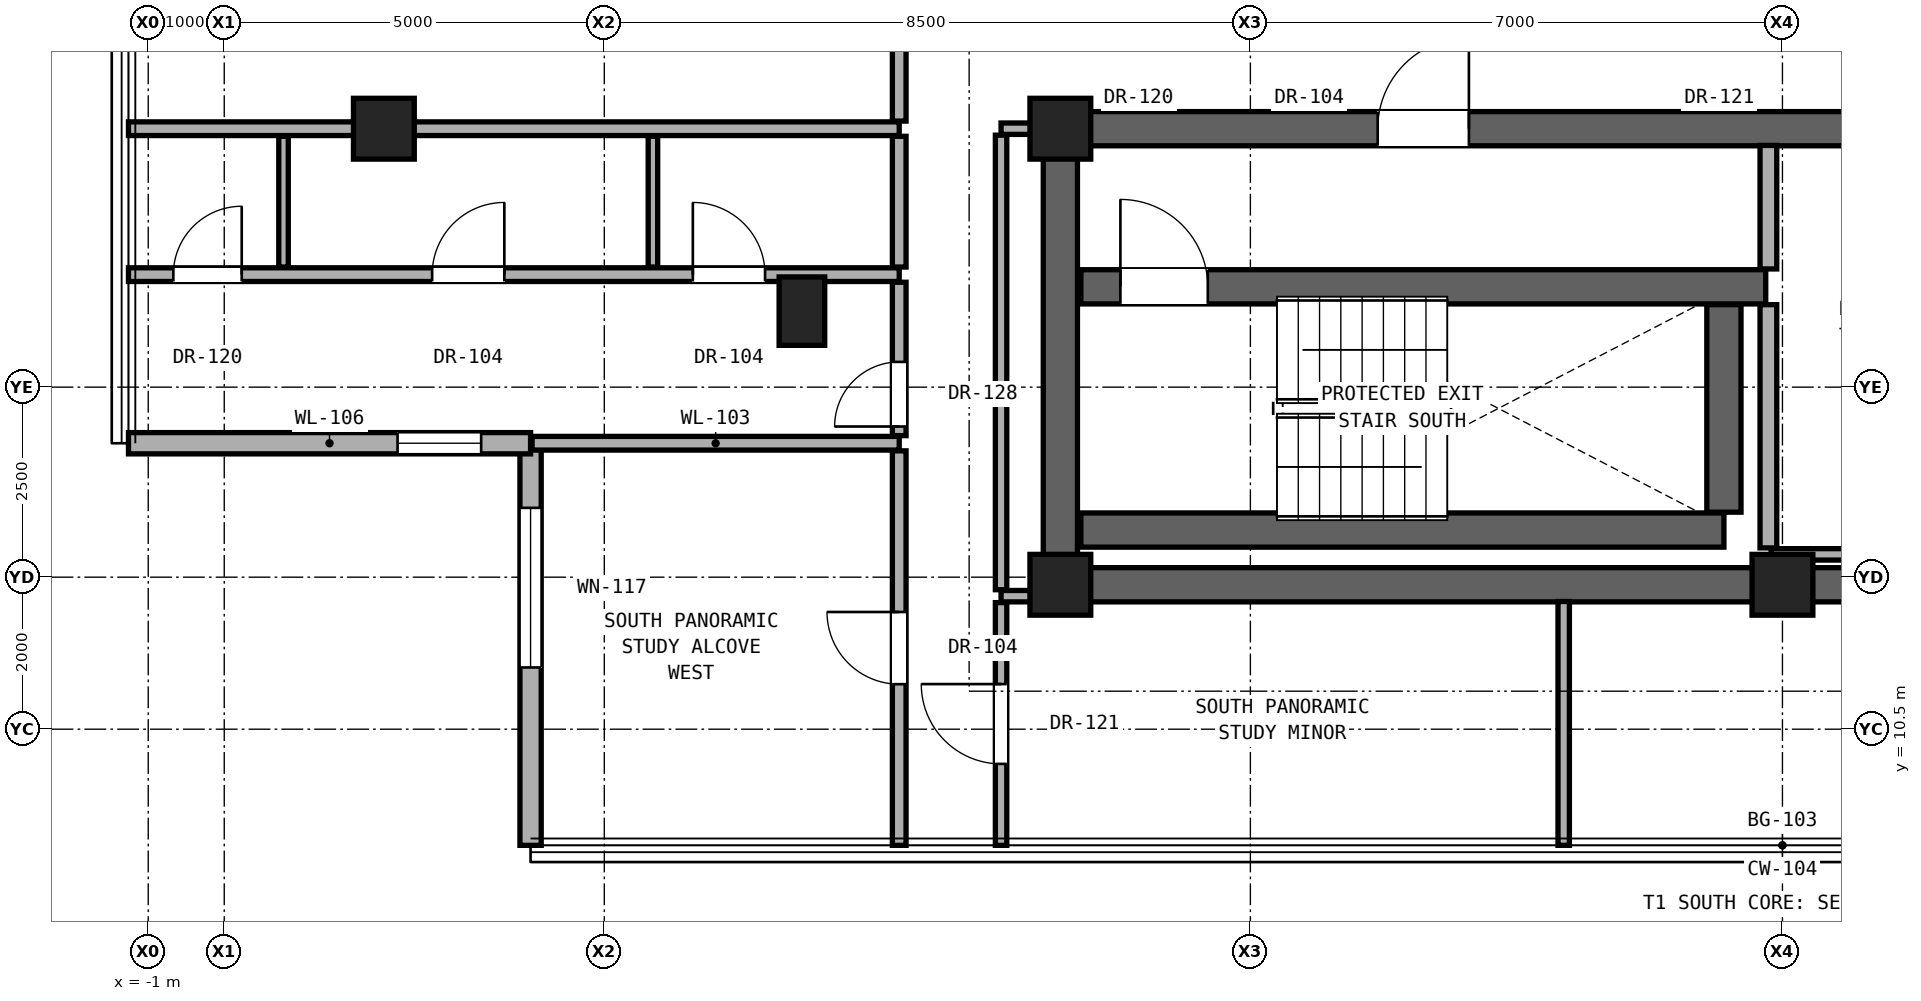
"""IFC4 building model, lengths in metres.
Left out: names, types, materials, properties, quantities, classifications, styles, units other than length and angle.
Written with IfcOpenShell. Run it as: python <this file> out.ifc"""

import sys

from ifc_helpers import new_model, si_unit, direction, frame, frame_2d, origin, origin_2d, place, context, subcontext, project, spatial, rectangle, hollow_rectangle, extrude, element, fill, save


model = new_model("IFC4")
c1 = context("Model", 3, precision=1e-05, world=origin(), true_north=direction((0.0, 1.0)))
c2 = subcontext(c1, "Body", "Model", "MODEL_VIEW")
j1 = project(units=[si_unit("LENGTHUNIT", "METRE"), si_unit("PLANEANGLEUNIT", "RADIAN")], contexts=[c1])
p1 = place(None, origin())
s1 = spatial("IfcSite", under=j1, at=p1, CompositionType="ELEMENT")
p2 = place(p1, origin())
s2 = spatial("IfcBuilding", under=s1, at=p2, CompositionType="ELEMENT")
p3 = place(p2, frame((0.0, 0.0, 239.2)))
s3 = spatial("IfcBuildingStorey", under=s2, at=p3, CompositionType="ELEMENT", Elevation=239.2)
for number, where, z_axis, x_axis in (
    (1, (11.0, 12.4, 0.0), (0.0, 0.0, 1.0), (1.0, 0.0, 0.0)),
    (2, (20.5, 12.4, 0.0), (0.0, 0.0, 1.0), (1.0, 0.0, 0.0)),
    (3, (11.0, 18.4, 0.0), (0.0, 0.0, 1.0), (1.0, 0.0, 0.0)),
):
    element("IfcColumn", number, at=place(p3, frame(where, z_axis=z_axis, x_axis=x_axis)), inside=s3, PredefinedType="COLUMN", context=c2, shape_type="SweptSolid", body=[
        extrude(rectangle(XDim=0.8, YDim=0.8, at=origin_2d()), origin(), (0.0, 0.0, 1.0), 3.3),
    ])
p4 = place(p3, frame((2.1, 18.4, 0.0), z_axis=(0.0, 0.0, 1.0), x_axis=(1.0, 0.0, 0.0)))
e4 = element("IfcColumn", 4, at=p4, inside=s3, PredefinedType="COLUMN", context=c2, shape_type="SweptSolid", body=[
    extrude(hollow_rectangle(XDim=0.8, YDim=0.8, WallThickness=0.045, at=origin_2d()), origin(), (0.0, 0.0, 1.0), 3.3),
])
p5 = place(p3, frame((7.6, 16.0, 0.0), z_axis=(0.0, 0.0, 1.0), x_axis=(1.0, 0.0, 0.0)))
e5 = element("IfcColumn", 5, at=p5, inside=s3, PredefinedType="PILASTER", context=c2, shape_type="SweptSolid", body=[
    extrude(rectangle(XDim=0.6, YDim=0.9, at=origin_2d()), origin(), (0.0, 0.0, 1.0), 3.3),
])
p6 = place(p3, frame((11.0, 12.4, 0.0), z_axis=(0.0, 0.0, 1.0), x_axis=(1.0, 0.0, 0.0)))
e6 = element("IfcWall", 6, at=p6, inside=s3, PredefinedType="SHEAR", context=c2, shape_type="SweptSolid", body=[
    extrude(rectangle(XDim=19.0, YDim=0.45, at=frame_2d((9.5, 0.0))), origin(), (0.0, 0.0, 1.0), 3.1),
])
p7 = place(p3, frame((11.0, 12.4, 0.0), z_axis=(0.0, 0.0, 1.0), x_axis=(0.0, 1.0, 0.0)))
e7 = element("IfcWall", 7, at=p7, inside=s3, PredefinedType="SHEAR", context=c2, shape_type="SweptSolid", body=[
    extrude(rectangle(XDim=6.0, YDim=0.45, at=frame_2d((3.0, 0.0))), origin(), (0.0, 0.0, 1.0), 3.1),
])
p8 = place(p3, frame((11.0, 18.4, 0.0), z_axis=(0.0, 0.0, 1.0), x_axis=(1.0, 0.0, 0.0)))
e8 = element("IfcWall", 8, at=p8, inside=s3, PredefinedType="SHEAR", context=c2, shape_type="SweptSolid", body=[
    extrude(rectangle(XDim=19.0, YDim=0.45, at=frame_2d((9.5, 0.0))), origin(), (0.0, 0.0, 1.0), 3.1),
])
p9 = place(p8, frame((4.175, 0.0, 0.0)))
e9 = element("IfcOpeningElement", 9, at=p9, cuts=e8, PredefinedType="OPENING", context=c2, shape_type="SweptSolid", body=[
    extrude(rectangle(XDim=1.2, YDim=2.25, at=frame_2d((0.6, 1.125))), frame((0.0, 0.235, 0.0), z_axis=(0.0, -1.0, 0.0), x_axis=(1.0, 0.0, 0.0)), (0.0, 0.0, 1.0), 0.47),
])
p10 = place(p8, frame((11.075, 0.0, 0.0)))
e10 = element("IfcOpeningElement", 10, at=p10, cuts=e8, PredefinedType="OPENING", context=c2, shape_type="SweptSolid", body=[
    extrude(rectangle(XDim=0.95, YDim=2.15, at=frame_2d((0.475, 1.075))), frame((0.0, 0.235, 0.0), z_axis=(0.0, -1.0, 0.0), x_axis=(1.0, 0.0, 0.0)), (0.0, 0.0, 1.0), 0.47),
])
p11 = place(p8, frame((14.3, 0.0, 0.0)))
e11 = element("IfcOpeningElement", 11, at=p11, cuts=e8, PredefinedType="OPENING", context=c2, shape_type="SweptSolid", body=[
    extrude(rectangle(XDim=1.3, YDim=2.3, at=frame_2d((0.65, 1.15))), frame((0.0, 0.235, 0.0), z_axis=(0.0, -1.0, 0.0), x_axis=(1.0, 0.0, 0.0)), (0.0, 0.0, 1.0), 0.47),
])
p12 = place(p8, frame((16.6, 0.0, 0.0)))
e12 = element("IfcOpeningElement", 12, at=p12, cuts=e8, PredefinedType="OPENING", context=c2, shape_type="SweptSolid", body=[
    extrude(rectangle(XDim=1.3, YDim=2.3, at=frame_2d((0.65, 1.15))), frame((0.0, 0.235, 0.0), z_axis=(0.0, -1.0, 0.0), x_axis=(1.0, 0.0, 0.0)), (0.0, 0.0, 1.0), 0.47),
])
p13 = place(p3, frame((4.03, 14.262, 0.0), z_axis=(0.0, 0.0, 1.0), x_axis=(0.0, -1.0, 0.0)))
e13 = element("IfcWall", 13, at=p13, inside=s3, PredefinedType="SOLIDWALL", context=c2, shape_type="SweptSolid", body=[
    extrude(rectangle(XDim=5.29, YDim=0.28, at=frame_2d((2.645, 0.0))), origin(), (0.0, 0.0, 1.0), 3.08),
])
p14 = place(p13, frame((0.85, 0.0, 0.73)))
e14 = element("IfcOpeningElement", 14, at=p14, cuts=e13, PredefinedType="OPENING", context=c2, shape_type="SweptSolid", body=[
    extrude(rectangle(XDim=2.1, YDim=2.2, at=frame_2d((1.05, 1.1))), frame((0.0, 0.15, 0.0), z_axis=(0.0, -1.0, 0.0), x_axis=(1.0, 0.0, 0.0)), (0.0, 0.0, 1.0), 0.3),
])
p15 = place(p3, frame((-1.26, 14.262, 0.0), z_axis=(0.0, 0.0, 1.0), x_axis=(1.0, 0.0, 0.0)))
e15 = element("IfcWall", 15, at=p15, inside=s3, PredefinedType="SOLIDWALL", context=c2, shape_type="SweptSolid", body=[
    extrude(rectangle(XDim=5.29, YDim=0.28, at=frame_2d((2.645, 0.0))), origin(), (0.0, 0.0, 1.0), 3.08),
])
p16 = place(p15, frame((3.54, 0.0, 0.85)))
e16 = element("IfcOpeningElement", 16, at=p16, cuts=e15, PredefinedType="OPENING", context=c2, shape_type="SweptSolid", body=[
    extrude(rectangle(XDim=1.1, YDim=2.0, at=frame_2d((0.55, 1.0))), frame((0.0, 0.15, 0.0), z_axis=(0.0, -1.0, 0.0), x_axis=(1.0, 0.0, 0.0)), (0.0, 0.0, 1.0), 0.3),
])
p17 = place(p3, frame((10.22, 12.25, 0.0), z_axis=(0.0, 0.0, 1.0), x_axis=(1.0, 0.0, 0.0)))
e17 = element("IfcWall", 17, at=p17, inside=s3, PredefinedType="PARTITIONING", context=c2, shape_type="SweptSolid", body=[
    extrude(rectangle(XDim=0.56, YDim=0.15, at=frame_2d((0.28, 0.0))), origin(), (0.0, 0.0, 1.0), 3.1),
])
p18 = place(p3, frame((20.35, 12.8, 0.0), z_axis=(0.0, 0.0, 1.0), x_axis=(1.0, 0.0, 0.0)))
e18 = element("IfcWall", 18, at=p18, inside=s3, PredefinedType="PARTITIONING", context=c2, shape_type="SweptSolid", body=[
    extrude(rectangle(XDim=8.9, YDim=0.15, at=frame_2d((4.45, 0.0))), origin(), (0.0, 0.0, 1.0), 3.1),
])
p19 = place(p3, frame((11.27, 13.12, 0.0), z_axis=(0.0, 0.0, 1.0), x_axis=(1.0, 0.0, 0.0)))
e19 = element("IfcWall", 19, at=p19, inside=s3, PredefinedType="SHEAR", context=c2, shape_type="SweptSolid", body=[
    extrude(rectangle(XDim=8.46, YDim=0.45, at=frame_2d((4.23, 0.0))), origin(), (0.0, 0.0, 1.0), 3.1),
])
p20 = place(p3, frame((4.05, 14.262, 0.0), z_axis=(0.0, 0.0, 1.0), x_axis=(1.0, 0.0, 0.0)))
e20 = element("IfcWall", 20, at=p20, inside=s3, PredefinedType="PARTITIONING", context=c2, shape_type="SweptSolid", body=[
    extrude(rectangle(XDim=4.83, YDim=0.18, at=frame_2d((2.415, 0.0))), origin(), (0.0, 0.0, 1.0), 3.1),
])
p21 = place(p3, frame((11.27, 16.32, 0.0), z_axis=(0.0, 0.0, 1.0), x_axis=(1.0, 0.0, 0.0)))
e21 = element("IfcWall", 21, at=p21, inside=s3, PredefinedType="SHEAR", context=c2, shape_type="SweptSolid", body=[
    extrude(rectangle(XDim=9.01, YDim=0.45, at=frame_2d((4.505, 0.0))), origin(), (0.0, 0.0, 1.0), 3.1),
])
p22 = place(p21, frame((0.52, 0.0, 0.0)))
e22 = element("IfcOpeningElement", 22, at=p22, cuts=e21, PredefinedType="OPENING", context=c2, shape_type="SweptSolid", body=[
    extrude(rectangle(XDim=1.15, YDim=2.2, at=frame_2d((0.575, 1.1))), frame((0.0, 0.235, 0.0), z_axis=(0.0, -1.0, 0.0), x_axis=(1.0, 0.0, 0.0)), (0.0, 0.0, 1.0), 0.47),
])
p23 = place(p3, frame((-1.26, 16.48, 0.0), z_axis=(0.0, 0.0, 1.0), x_axis=(1.0, 0.0, 0.0)))
e23 = element("IfcWall", 23, at=p23, inside=s3, PredefinedType="PARTITIONING", context=c2, shape_type="SweptSolid", body=[
    extrude(rectangle(XDim=10.14, YDim=0.18, at=frame_2d((5.07, 0.0))), origin(), (0.0, 0.0, 1.0), 2.543),
])
p24 = place(p23, frame((3.995, 0.0, 0.0)))
e24 = element("IfcOpeningElement", 24, at=p24, cuts=e23, PredefinedType="OPENING", context=c2, shape_type="SweptSolid", body=[
    extrude(rectangle(XDim=0.95, YDim=2.15, at=frame_2d((0.475, 1.075))), frame((0.0, 0.1, 0.0), z_axis=(0.0, -1.0, 0.0), x_axis=(1.0, 0.0, 0.0)), (0.0, 0.0, 1.0), 0.2),
])
p25 = place(p23, frame((7.425, 0.0, 0.0)))
e25 = element("IfcOpeningElement", 25, at=p25, cuts=e23, PredefinedType="OPENING", context=c2, shape_type="SweptSolid", body=[
    extrude(rectangle(XDim=0.95, YDim=2.15, at=frame_2d((0.475, 1.075))), frame((0.0, 0.1, 0.0), z_axis=(0.0, -1.0, 0.0), x_axis=(1.0, 0.0, 0.0)), (0.0, 0.0, 1.0), 0.2),
])
p26 = place(p23, frame((0.59, 0.0, 0.0)))
e26 = element("IfcOpeningElement", 26, at=p26, cuts=e23, PredefinedType="OPENING", context=c2, shape_type="SweptSolid", body=[
    extrude(rectangle(XDim=0.9, YDim=2.1, at=frame_2d((0.45, 1.05))), frame((0.0, 0.1, 0.0), z_axis=(0.0, -1.0, 0.0), x_axis=(1.0, 0.0, 0.0)), (0.0, 0.0, 1.0), 0.2),
])
p27 = place(p3, frame((-1.26, 18.4, 0.0), z_axis=(0.0, 0.0, 1.0), x_axis=(1.0, 0.0, 0.0)))
e27 = element("IfcWall", 27, at=p27, inside=s3, PredefinedType="PARTITIONING", context=c2, shape_type="SweptSolid", body=[
    extrude(rectangle(XDim=10.14, YDim=0.18, at=frame_2d((5.07, 0.0))), origin(), (0.0, 0.0, 1.0), 2.319),
])
p28 = place(p3, frame((10.22, 18.4, 0.0), z_axis=(0.0, 0.0, 1.0), x_axis=(1.0, 0.0, 0.0)))
e28 = element("IfcWall", 28, at=p28, inside=s3, PredefinedType="PARTITIONING", context=c2, shape_type="SweptSolid", body=[
    extrude(rectangle(XDim=0.56, YDim=0.15, at=frame_2d((0.28, 0.0))), origin(), (0.0, 0.0, 1.0), 2.492),
])
p29 = place(p3, frame((0.78, 16.58, 0.0), z_axis=(0.0, 0.0, 1.0), x_axis=(0.0, 1.0, 0.0)))
e29 = element("IfcWall", 29, at=p29, inside=s3, PredefinedType="PARTITIONING", context=c2, shape_type="SweptSolid", body=[
    extrude(rectangle(XDim=1.72, YDim=0.125, at=frame_2d((0.86, 0.0))), origin(), (0.0, 0.0, 1.0), 3.1),
])
p30 = place(p3, frame((5.64, 16.58, 0.0), z_axis=(0.0, 0.0, 1.0), x_axis=(0.0, 1.0, 0.0)))
e30 = element("IfcWall", 30, at=p30, inside=s3, PredefinedType="PARTITIONING", context=c2, shape_type="SweptSolid", body=[
    extrude(rectangle(XDim=1.72, YDim=0.125, at=frame_2d((0.86, 0.0))), origin(), (0.0, 0.0, 1.0), 2.492),
])
p31 = place(p3, frame((8.88, 8.972, 0.0), z_axis=(0.0, 0.0, 1.0), x_axis=(0.0, 1.0, 0.0)))
e31 = element("IfcWall", 31, at=p31, inside=s3, PredefinedType="PARTITIONING", context=c2, shape_type="SweptSolid", body=[
    extrude(rectangle(XDim=5.19, YDim=0.18, at=frame_2d((2.595, 0.0))), origin(), (0.0, 0.0, 1.0), 3.1),
])
p32 = place(p31, frame((2.12, 0.0, 0.0)))
e32 = element("IfcOpeningElement", 32, at=p32, cuts=e31, PredefinedType="OPENING", context=c2, shape_type="SweptSolid", body=[
    extrude(rectangle(XDim=0.95, YDim=2.15, at=frame_2d((0.475, 1.075))), frame((0.0, 0.1, 0.0), z_axis=(0.0, -1.0, 0.0), x_axis=(1.0, 0.0, 0.0)), (0.0, 0.0, 1.0), 0.2),
])
p33 = place(p3, frame((8.88, 14.362, 0.0), z_axis=(0.0, 0.0, 1.0), x_axis=(0.0, 1.0, 0.0)))
e33 = element("IfcWall", 33, at=p33, inside=s3, PredefinedType="PARTITIONING", context=c2, shape_type="SweptSolid", body=[
    extrude(rectangle(XDim=2.018, YDim=0.18, at=frame_2d((1.009, 0.0))), origin(), (0.0, 0.0, 1.0), 3.1),
])
p34 = place(p33, frame((0.12, 0.0, 0.0)))
e34 = element("IfcOpeningElement", 34, at=p34, cuts=e33, PredefinedType="OPENING", context=c2, shape_type="SweptSolid", body=[
    extrude(rectangle(XDim=0.85, YDim=2.01, at=frame_2d((0.425, 1.005))), frame((0.0, 0.1, 0.0), z_axis=(0.0, -1.0, 0.0), x_axis=(1.0, 0.0, 0.0)), (0.0, 0.0, 1.0), 0.2),
])
p35 = place(p3, frame((8.88, 16.58, 0.0), z_axis=(0.0, 0.0, 1.0), x_axis=(0.0, 1.0, 0.0)))
e35 = element("IfcWall", 35, at=p35, inside=s3, PredefinedType="PARTITIONING", context=c2, shape_type="SweptSolid", body=[
    extrude(rectangle(XDim=1.72, YDim=0.18, at=frame_2d((0.86, 0.0))), origin(), (0.0, 0.0, 1.0), 2.492),
])
p36 = place(p3, frame((8.88, 18.5, 0.0), z_axis=(0.0, 0.0, 1.0), x_axis=(0.0, 1.0, 0.0)))
e36 = element("IfcWall", 36, at=p36, inside=s3, PredefinedType="PARTITIONING", context=c2, shape_type="SweptSolid", body=[
    extrude(rectangle(XDim=10.3, YDim=0.18, at=frame_2d((5.15, 0.0))), origin(), (0.0, 0.0, 1.0), 2.396),
])
p37 = place(p36, frame((4.625, 0.0, 0.0)))
e37 = element("IfcOpeningElement", 37, at=p37, cuts=e36, PredefinedType="OPENING", context=c2, shape_type="SweptSolid", body=[
    extrude(rectangle(XDim=1.05, YDim=2.2, at=frame_2d((0.525, 1.1))), frame((0.0, 0.1, 0.0), z_axis=(0.0, -1.0, 0.0), x_axis=(1.0, 0.0, 0.0)), (0.0, 0.0, 1.0), 0.2),
])
p38 = place(p3, frame((10.22, 8.972, 0.0), z_axis=(0.0, 0.0, 1.0), x_axis=(0.0, 1.0, 0.0)))
e38 = element("IfcWall", 38, at=p38, inside=s3, PredefinedType="PARTITIONING", context=c2, shape_type="SweptSolid", body=[
    extrude(rectangle(XDim=3.193, YDim=0.15, at=frame_2d((1.597, 0.0))), origin(), (0.0, 0.0, 1.0), 3.1),
])
p39 = place(p38, frame((1.072, 0.0, 0.0)))
e39 = element("IfcOpeningElement", 39, at=p39, cuts=e38, PredefinedType="OPENING", context=c2, shape_type="SweptSolid", body=[
    extrude(rectangle(XDim=1.05, YDim=2.2, at=frame_2d((0.525, 1.1))), frame((0.0, 0.085, 0.0), z_axis=(0.0, -1.0, 0.0), x_axis=(1.0, 0.0, 0.0)), (0.0, 0.0, 1.0), 0.17),
])
p40 = place(p3, frame((10.22, 12.335, 0.0), z_axis=(0.0, 0.0, 1.0), x_axis=(0.0, 1.0, 0.0)))
e40 = element("IfcWall", 40, at=p40, inside=s3, PredefinedType="PARTITIONING", context=c2, shape_type="SweptSolid", body=[
    extrude(rectangle(XDim=5.98, YDim=0.15, at=frame_2d((2.99, 0.0))), origin(), (0.0, 0.0, 1.0), 2.492),
])
p41 = place(p3, frame((17.622, 8.972, 0.0), z_axis=(0.0, 0.0, 1.0), x_axis=(0.0, 1.0, 0.0)))
e41 = element("IfcWall", 41, at=p41, inside=s3, PredefinedType="PARTITIONING", context=c2, shape_type="SweptSolid", body=[
    extrude(rectangle(XDim=3.208, YDim=0.15, at=frame_2d((1.604, 0.0))), origin(), (0.0, 0.0, 1.0), 3.1),
])
p42 = place(p3, frame((19.73, 13.355, 0.0), z_axis=(0.0, 0.0, 1.0), x_axis=(0.0, 1.0, 0.0)))
e42 = element("IfcWall", 42, at=p42, inside=s3, PredefinedType="SHEAR", context=c2, shape_type="SweptSolid", body=[
    extrude(rectangle(XDim=2.73, YDim=0.45, at=frame_2d((1.365, 0.0))), origin(), (0.0, 0.0, 1.0), 3.1),
])
p43 = place(p3, frame((20.315, 12.885, 0.0), z_axis=(0.0, 0.0, 1.0), x_axis=(0.0, 1.0, 0.0)))
e43 = element("IfcWall", 43, at=p43, inside=s3, PredefinedType="SOLIDWALL", context=c2, shape_type="SweptSolid", body=[
    extrude(rectangle(XDim=3.2, YDim=0.22, at=frame_2d((1.6, 0.0))), origin(), (0.0, 0.0, 1.0), 3.1),
])
p44 = place(p3, frame((20.315, 16.555, 0.0), z_axis=(0.0, 0.0, 1.0), x_axis=(0.0, 1.0, 0.0)))
e44 = element("IfcWall", 44, at=p44, inside=s3, PredefinedType="SOLIDWALL", context=c2, shape_type="SweptSolid", body=[
    extrude(rectangle(XDim=1.625, YDim=0.22, at=frame_2d((0.812, 0.0))), origin(), (0.0, 0.0, 1.0), 3.1),
])
p45 = place(p14, origin())
e45 = element("IfcWindow", 45, at=p45, inside=s3, PartitioningType="SINGLE_PANEL", PredefinedType="WINDOW", context=c2, shape_type="SweptSolid", body=[
    extrude(rectangle(XDim=2.1, YDim=2.2, at=frame_2d((1.05, 1.1))), frame((0.0, 0.03, 0.0), z_axis=(0.0, -1.0, 0.0), x_axis=(1.0, 0.0, 0.0)), (0.0, 0.0, 1.0), 0.06),
])
fill(e14, e45)
p46 = place(p16, origin())
e46 = element("IfcWindow", 46, at=p46, inside=s3, PartitioningType="SINGLE_PANEL", PredefinedType="WINDOW", context=c2, shape_type="SweptSolid", body=[
    extrude(rectangle(XDim=1.1, YDim=2.0, at=frame_2d((0.55, 1.0))), frame((0.0, 0.03, 0.0), z_axis=(0.0, -1.0, 0.0), x_axis=(1.0, 0.0, 0.0)), (0.0, 0.0, 1.0), 0.06),
])
fill(e16, e46)
p47 = place(p9, origin())
e47 = element("IfcDoor", 47, at=p47, inside=s3, OperationType="SINGLE_SWING_RIGHT", PredefinedType="DOOR", context=c2, shape_type="SweptSolid", body=[
    extrude(rectangle(XDim=1.2, YDim=2.25, at=frame_2d((0.6, 1.125))), frame((0.0, 0.025, 0.0), z_axis=(0.0, -1.0, 0.0), x_axis=(1.0, 0.0, 0.0)), (0.0, 0.0, 1.0), 0.05),
])
fill(e9, e47)
p48 = place(p22, origin())
e48 = element("IfcDoor", 48, at=p48, inside=s3, OperationType="SINGLE_SWING_LEFT", PredefinedType="DOOR", context=c2, shape_type="SweptSolid", body=[
    extrude(rectangle(XDim=1.15, YDim=2.2, at=frame_2d((0.575, 1.1))), frame((0.0, 0.025, 0.0), z_axis=(0.0, -1.0, 0.0), x_axis=(1.0, 0.0, 0.0)), (0.0, 0.0, 1.0), 0.05),
])
fill(e22, e48)
p49 = place(p34, origin())
e49 = element("IfcDoor", 49, at=p49, inside=s3, OperationType="SINGLE_SWING_LEFT", PredefinedType="DOOR", context=c2, shape_type="SweptSolid", body=[
    extrude(rectangle(XDim=0.85, YDim=2.01, at=frame_2d((0.425, 1.005))), frame((0.0, 0.025, 0.0), z_axis=(0.0, -1.0, 0.0), x_axis=(1.0, 0.0, 0.0)), (0.0, 0.0, 1.0), 0.05),
])
fill(e34, e49)
p50 = place(p24, origin())
e50 = element("IfcDoor", 50, at=p50, inside=s3, OperationType="SINGLE_SWING_RIGHT", PredefinedType="DOOR", context=c2, shape_type="SweptSolid", body=[
    extrude(rectangle(XDim=0.95, YDim=2.15, at=frame_2d((0.475, 1.075))), frame((0.0, 0.025, 0.0), z_axis=(0.0, -1.0, 0.0), x_axis=(1.0, 0.0, 0.0)), (0.0, 0.0, 1.0), 0.05),
])
fill(e24, e50)
p51 = place(p25, origin())
e51 = element("IfcDoor", 51, at=p51, inside=s3, OperationType="SINGLE_SWING_LEFT", PredefinedType="DOOR", context=c2, shape_type="SweptSolid", body=[
    extrude(rectangle(XDim=0.95, YDim=2.15, at=frame_2d((0.475, 1.075))), frame((0.0, 0.025, 0.0), z_axis=(0.0, -1.0, 0.0), x_axis=(1.0, 0.0, 0.0)), (0.0, 0.0, 1.0), 0.05),
])
fill(e25, e51)
p52 = place(p26, origin())
e52 = element("IfcDoor", 52, at=p52, inside=s3, OperationType="SINGLE_SWING_RIGHT", PredefinedType="DOOR", context=c2, shape_type="SweptSolid", body=[
    extrude(rectangle(XDim=0.9, YDim=2.1, at=frame_2d((0.45, 1.05))), frame((0.0, 0.025, 0.0), z_axis=(0.0, -1.0, 0.0), x_axis=(1.0, 0.0, 0.0)), (0.0, 0.0, 1.0), 0.05),
])
fill(e26, e52)
p53 = place(p39, origin())
e53 = element("IfcDoor", 53, at=p53, inside=s3, OperationType="SINGLE_SWING_RIGHT", PredefinedType="DOOR", context=c2, shape_type="SweptSolid", body=[
    extrude(rectangle(XDim=1.05, YDim=2.2, at=frame_2d((0.525, 1.1))), frame((0.0, 0.025, 0.0), z_axis=(0.0, -1.0, 0.0), x_axis=(1.0, 0.0, 0.0)), (0.0, 0.0, 1.0), 0.05),
])
fill(e39, e53)
p54 = place(p32, origin())
e54 = element("IfcDoor", 54, at=p54, inside=s3, OperationType="SINGLE_SWING_RIGHT", PredefinedType="DOOR", context=c2, shape_type="SweptSolid", body=[
    extrude(rectangle(XDim=0.95, YDim=2.15, at=frame_2d((0.475, 1.075))), frame((0.0, 0.025, 0.0), z_axis=(0.0, -1.0, 0.0), x_axis=(1.0, 0.0, 0.0)), (0.0, 0.0, 1.0), 0.05),
])
fill(e32, e54)
save(model, sys.argv[1])
